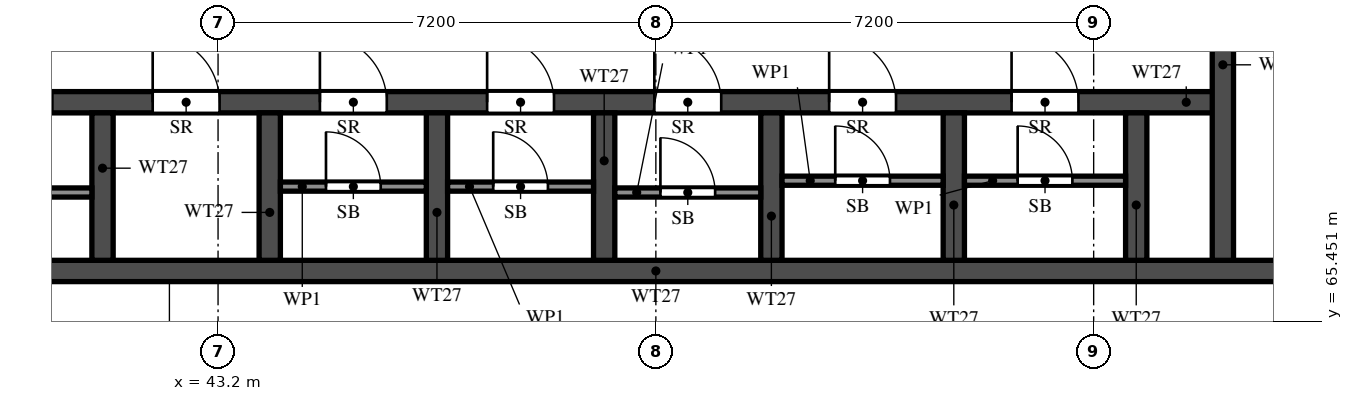
"""IFC4 building model, lengths in metres.
Left out: names, types, materials, properties, quantities, classifications, styles, units other than length and angle.
Written with IfcOpenShell. Run it as: python <this file> out.ifc"""

import sys

from ifc_helpers import new_model, si_unit, direction, frame, frame_2d, origin, place, context, subcontext, project, spatial, rectangle, extrude, element, fill, save


model = new_model("IFC4")
c1 = context("Model", 3, precision=1e-05, world=origin(), true_north=direction((0.0, 1.0)))
c2 = subcontext(c1, "Body", "Model", "MODEL_VIEW")
j1 = project(units=[si_unit("LENGTHUNIT", "METRE"), si_unit("PLANEANGLEUNIT", "RADIAN")], contexts=[c1])
p1 = place(None, origin())
s1 = spatial("IfcSite", under=j1, at=p1, CompositionType="ELEMENT")
p2 = place(p1, origin())
s2 = spatial("IfcBuilding", under=s1, at=p2, CompositionType="ELEMENT")
p3 = place(p2, frame((0.0, 0.0, 146.5)))
s3 = spatial("IfcBuildingStorey", under=s2, at=p3, CompositionType="ELEMENT", Elevation=146.5)
p4 = place(p3, frame((29.7, 66.275, 0.0), z_axis=(0.0, 0.0, 1.0), x_axis=(1.0, 0.0, 0.0)))
e1 = element("IfcWall", 1, at=p4, inside=s3, PredefinedType="SHEAR", context=c2, shape_type="SweptSolid", body=[
    extrude(rectangle(XDim=41.4, YDim=0.35, at=frame_2d((20.7, 0.0))), origin(), (0.0, 0.0, 1.0), 3.2),
])
p5 = place(p4, frame((0.925, 0.0, 0.0)))
e2 = element("IfcOpeningElement", 2, at=p5, cuts=e1, PredefinedType="OPENING", context=c2, shape_type="SweptSolid", body=[
    extrude(rectangle(XDim=1.1, YDim=2.1, at=frame_2d((0.55, 1.05))), frame((0.0, 0.185, 0.0), z_axis=(0.0, -1.0, 0.0), x_axis=(1.0, 0.0, 0.0)), (0.0, 0.0, 1.0), 0.37),
])
p6 = place(p4, frame((3.712, 0.0, 0.0)))
e3 = element("IfcOpeningElement", 3, at=p6, cuts=e1, PredefinedType="OPENING", context=c2, shape_type="SweptSolid", body=[
    extrude(rectangle(XDim=1.8, YDim=2.1, at=frame_2d((0.9, 1.05))), frame((0.0, 0.185, 0.0), z_axis=(0.0, -1.0, 0.0), x_axis=(1.0, 0.0, 0.0)), (0.0, 0.0, 1.0), 0.37),
])
p7 = place(p3, frame((35.625, 69.05, 0.0), z_axis=(0.0, 0.0, 1.0), x_axis=(1.0, 0.0, 0.0)))
e4 = element("IfcWall", 4, at=p7, inside=s3, PredefinedType="SHEAR", context=c2, shape_type="SweptSolid", body=[
    extrude(rectangle(XDim=24.1, YDim=0.35, at=frame_2d((12.05, 0.0))), origin(), (0.0, 0.0, 1.0), 3.2),
])
p8 = place(p7, frame((1.0, 0.0, 0.0)))
e5 = element("IfcOpeningElement", 5, at=p8, cuts=e4, PredefinedType="OPENING", context=c2, shape_type="SweptSolid", body=[
    extrude(rectangle(XDim=1.1, YDim=2.1, at=frame_2d((0.55, 1.05))), frame((0.0, 0.185, 0.0), z_axis=(0.0, -1.0, 0.0), x_axis=(1.0, 0.0, 0.0)), (0.0, 0.0, 1.0), 0.37),
])
p9 = place(p7, frame((3.75, 0.0, 0.0)))
e6 = element("IfcOpeningElement", 6, at=p9, cuts=e4, PredefinedType="OPENING", context=c2, shape_type="SweptSolid", body=[
    extrude(rectangle(XDim=1.1, YDim=2.1, at=frame_2d((0.55, 1.05))), frame((0.0, 0.185, 0.0), z_axis=(0.0, -1.0, 0.0), x_axis=(1.0, 0.0, 0.0)), (0.0, 0.0, 1.0), 0.37),
])
p10 = place(p7, frame((6.5, 0.0, 0.0)))
e7 = element("IfcOpeningElement", 7, at=p10, cuts=e4, PredefinedType="OPENING", context=c2, shape_type="SweptSolid", body=[
    extrude(rectangle(XDim=1.1, YDim=2.1, at=frame_2d((0.55, 1.05))), frame((0.0, 0.185, 0.0), z_axis=(0.0, -1.0, 0.0), x_axis=(1.0, 0.0, 0.0)), (0.0, 0.0, 1.0), 0.37),
])
p11 = place(p7, frame((9.25, 0.0, 0.0)))
e8 = element("IfcOpeningElement", 8, at=p11, cuts=e4, PredefinedType="OPENING", context=c2, shape_type="SweptSolid", body=[
    extrude(rectangle(XDim=1.1, YDim=2.1, at=frame_2d((0.55, 1.05))), frame((0.0, 0.185, 0.0), z_axis=(0.0, -1.0, 0.0), x_axis=(1.0, 0.0, 0.0)), (0.0, 0.0, 1.0), 0.37),
])
p12 = place(p7, frame((12.0, 0.0, 0.0)))
e9 = element("IfcOpeningElement", 9, at=p12, cuts=e4, PredefinedType="OPENING", context=c2, shape_type="SweptSolid", body=[
    extrude(rectangle(XDim=1.1, YDim=2.1, at=frame_2d((0.55, 1.05))), frame((0.0, 0.185, 0.0), z_axis=(0.0, -1.0, 0.0), x_axis=(1.0, 0.0, 0.0)), (0.0, 0.0, 1.0), 0.37),
])
p13 = place(p7, frame((14.75, 0.0, 0.0)))
e10 = element("IfcOpeningElement", 10, at=p13, cuts=e4, PredefinedType="OPENING", context=c2, shape_type="SweptSolid", body=[
    extrude(rectangle(XDim=1.1, YDim=2.1, at=frame_2d((0.55, 1.05))), frame((0.0, 0.185, 0.0), z_axis=(0.0, -1.0, 0.0), x_axis=(1.0, 0.0, 0.0)), (0.0, 0.0, 1.0), 0.37),
])
p14 = place(p7, frame((17.625, 0.0, 0.0)))
e11 = element("IfcOpeningElement", 11, at=p14, cuts=e4, PredefinedType="OPENING", context=c2, shape_type="SweptSolid", body=[
    extrude(rectangle(XDim=1.1, YDim=2.1, at=frame_2d((0.55, 1.05))), frame((0.0, 0.185, 0.0), z_axis=(0.0, -1.0, 0.0), x_axis=(1.0, 0.0, 0.0)), (0.0, 0.0, 1.0), 0.37),
])
p15 = place(p7, frame((20.625, 0.0, 0.0)))
e12 = element("IfcOpeningElement", 12, at=p15, cuts=e4, PredefinedType="OPENING", context=c2, shape_type="SweptSolid", body=[
    extrude(rectangle(XDim=1.1, YDim=2.1, at=frame_2d((0.55, 1.05))), frame((0.0, 0.185, 0.0), z_axis=(0.0, -1.0, 0.0), x_axis=(1.0, 0.0, 0.0)), (0.0, 0.0, 1.0), 0.37),
])
p16 = place(p3, frame((59.725, 66.45, 0.0), z_axis=(0.0, 0.0, 1.0), x_axis=(0.0, 1.0, 0.0)))
e13 = element("IfcWall", 13, at=p16, inside=s3, PredefinedType="SHEAR", context=c2, shape_type="SweptSolid", body=[
    extrude(rectangle(XDim=6.125, YDim=0.35, at=frame_2d((3.062, 0.0))), origin(), (0.0, 0.0, 1.0), 3.2),
])
p17 = place(p16, frame((3.85, 0.0, 0.0)))
e14 = element("IfcOpeningElement", 14, at=p17, cuts=e13, PredefinedType="OPENING", context=c2, shape_type="SweptSolid", body=[
    extrude(rectangle(XDim=1.2, YDim=2.1, at=frame_2d((0.6, 1.05))), frame((0.0, 0.185, 0.0), z_axis=(0.0, -1.0, 0.0), x_axis=(1.0, 0.0, 0.0)), (0.0, 0.0, 1.0), 0.37),
])
for number, where, z_axis, x_axis in (
    (15, (41.3, 66.45, 0.0), (0.0, 0.0, 1.0), (0.0, 1.0, 0.0)),
    (16, (44.05, 66.45, 0.0), (0.0, 0.0, 1.0), (0.0, 1.0, 0.0)),
    (17, (46.8, 66.45, 0.0), (0.0, 0.0, 1.0), (0.0, 1.0, 0.0)),
    (18, (49.55, 66.45, 0.0), (0.0, 0.0, 1.0), (0.0, 1.0, 0.0)),
    (19, (52.3, 66.45, 0.0), (0.0, 0.0, 1.0), (0.0, 1.0, 0.0)),
    (20, (55.3, 66.45, 0.0), (0.0, 0.0, 1.0), (0.0, 1.0, 0.0)),
    (21, (58.3, 66.45, 0.0), (0.0, 0.0, 1.0), (0.0, 1.0, 0.0)),
):
    element("IfcWall", number, at=place(p3, frame(where, z_axis=z_axis, x_axis=x_axis)), inside=s3, PredefinedType="SHEAR", context=c2, shape_type="SweptSolid", body=[
        extrude(rectangle(XDim=2.425, YDim=0.35, at=frame_2d((1.212, 0.0))), origin(), (0.0, 0.0, 1.0), 3.2),
    ])
p18 = place(p3, frame((38.725, 67.565, 0.0), z_axis=(0.0, 0.0, 1.0), x_axis=(1.0, 0.0, 0.0)))
e22 = element("IfcWall", 22, at=p18, inside=s3, PredefinedType="PARTITIONING", context=c2, shape_type="SweptSolid", body=[
    extrude(rectangle(XDim=2.4, YDim=0.15, at=frame_2d((1.2, 0.0))), origin(), (0.0, 0.0, 1.0), 3.2),
])
p19 = place(p18, frame((0.75, 0.0, 0.0)))
e23 = element("IfcOpeningElement", 23, at=p19, cuts=e22, PredefinedType="OPENING", context=c2, shape_type="SweptSolid", body=[
    extrude(rectangle(XDim=0.9, YDim=2.1, at=frame_2d((0.45, 1.05))), frame((0.0, 0.085, 0.0), z_axis=(0.0, -1.0, 0.0), x_axis=(1.0, 0.0, 0.0)), (0.0, 0.0, 1.0), 0.17),
])
p20 = place(p3, frame((44.225, 67.663, 0.0), z_axis=(0.0, 0.0, 1.0), x_axis=(1.0, 0.0, 0.0)))
e24 = element("IfcWall", 24, at=p20, inside=s3, PredefinedType="PARTITIONING", context=c2, shape_type="SweptSolid", body=[
    extrude(rectangle(XDim=2.4, YDim=0.15, at=frame_2d((1.2, 0.0))), origin(), (0.0, 0.0, 1.0), 3.2),
])
p21 = place(p20, frame((0.75, 0.0, 0.0)))
e25 = element("IfcOpeningElement", 25, at=p21, cuts=e24, PredefinedType="OPENING", context=c2, shape_type="SweptSolid", body=[
    extrude(rectangle(XDim=0.9, YDim=2.1, at=frame_2d((0.45, 1.05))), frame((0.0, 0.085, 0.0), z_axis=(0.0, -1.0, 0.0), x_axis=(1.0, 0.0, 0.0)), (0.0, 0.0, 1.0), 0.17),
])
p22 = place(p3, frame((46.975, 67.663, 0.0), z_axis=(0.0, 0.0, 1.0), x_axis=(1.0, 0.0, 0.0)))
e26 = element("IfcWall", 26, at=p22, inside=s3, PredefinedType="PARTITIONING", context=c2, shape_type="SweptSolid", body=[
    extrude(rectangle(XDim=2.4, YDim=0.15, at=frame_2d((1.2, 0.0))), origin(), (0.0, 0.0, 1.0), 3.2),
])
p23 = place(p22, frame((0.75, 0.0, 0.0)))
e27 = element("IfcOpeningElement", 27, at=p23, cuts=e26, PredefinedType="OPENING", context=c2, shape_type="SweptSolid", body=[
    extrude(rectangle(XDim=0.9, YDim=2.1, at=frame_2d((0.45, 1.05))), frame((0.0, 0.085, 0.0), z_axis=(0.0, -1.0, 0.0), x_axis=(1.0, 0.0, 0.0)), (0.0, 0.0, 1.0), 0.17),
])
p24 = place(p3, frame((49.725, 67.565, 0.0), z_axis=(0.0, 0.0, 1.0), x_axis=(1.0, 0.0, 0.0)))
e28 = element("IfcWall", 28, at=p24, inside=s3, PredefinedType="PARTITIONING", context=c2, shape_type="SweptSolid", body=[
    extrude(rectangle(XDim=2.4, YDim=0.15, at=frame_2d((1.2, 0.0))), origin(), (0.0, 0.0, 1.0), 3.2),
])
p25 = place(p24, frame((0.75, 0.0, 0.0)))
e29 = element("IfcOpeningElement", 29, at=p25, cuts=e28, PredefinedType="OPENING", context=c2, shape_type="SweptSolid", body=[
    extrude(rectangle(XDim=0.9, YDim=2.1, at=frame_2d((0.45, 1.05))), frame((0.0, 0.085, 0.0), z_axis=(0.0, -1.0, 0.0), x_axis=(1.0, 0.0, 0.0)), (0.0, 0.0, 1.0), 0.17),
])
p26 = place(p3, frame((52.475, 67.76, 0.0), z_axis=(0.0, 0.0, 1.0), x_axis=(1.0, 0.0, 0.0)))
e30 = element("IfcWall", 30, at=p26, inside=s3, PredefinedType="PARTITIONING", context=c2, shape_type="SweptSolid", body=[
    extrude(rectangle(XDim=2.65, YDim=0.15, at=frame_2d((1.325, 0.0))), origin(), (0.0, 0.0, 1.0), 3.2),
])
p27 = place(p26, frame((0.875, 0.0, 0.0)))
e31 = element("IfcOpeningElement", 31, at=p27, cuts=e30, PredefinedType="OPENING", context=c2, shape_type="SweptSolid", body=[
    extrude(rectangle(XDim=0.9, YDim=2.1, at=frame_2d((0.45, 1.05))), frame((0.0, 0.085, 0.0), z_axis=(0.0, -1.0, 0.0), x_axis=(1.0, 0.0, 0.0)), (0.0, 0.0, 1.0), 0.17),
])
p28 = place(p3, frame((55.475, 67.76, 0.0), z_axis=(0.0, 0.0, 1.0), x_axis=(1.0, 0.0, 0.0)))
e32 = element("IfcWall", 32, at=p28, inside=s3, PredefinedType="PARTITIONING", context=c2, shape_type="SweptSolid", body=[
    extrude(rectangle(XDim=2.65, YDim=0.15, at=frame_2d((1.325, 0.0))), origin(), (0.0, 0.0, 1.0), 3.2),
])
p29 = place(p28, frame((0.875, 0.0, 0.0)))
e33 = element("IfcOpeningElement", 33, at=p29, cuts=e32, PredefinedType="OPENING", context=c2, shape_type="SweptSolid", body=[
    extrude(rectangle(XDim=0.9, YDim=2.1, at=frame_2d((0.45, 1.05))), frame((0.0, 0.085, 0.0), z_axis=(0.0, -1.0, 0.0), x_axis=(1.0, 0.0, 0.0)), (0.0, 0.0, 1.0), 0.17),
])
p30 = place(p10, origin())
e34 = element("IfcDoor", 34, at=p30, inside=s3, OperationType="SINGLE_SWING_RIGHT", PredefinedType="DOOR", context=c2, shape_type="SweptSolid", body=[
    extrude(rectangle(XDim=1.1, YDim=2.1, at=frame_2d((0.55, 1.05))), frame((0.0, 0.025, 0.0), z_axis=(0.0, -1.0, 0.0), x_axis=(1.0, 0.0, 0.0)), (0.0, 0.0, 1.0), 0.05),
])
fill(e7, e34)
p31 = place(p11, origin())
e35 = element("IfcDoor", 35, at=p31, inside=s3, OperationType="SINGLE_SWING_LEFT", PredefinedType="DOOR", context=c2, shape_type="SweptSolid", body=[
    extrude(rectangle(XDim=1.1, YDim=2.1, at=frame_2d((0.55, 1.05))), frame((0.0, 0.025, 0.0), z_axis=(0.0, -1.0, 0.0), x_axis=(1.0, 0.0, 0.0)), (0.0, 0.0, 1.0), 0.05),
])
fill(e8, e35)
p32 = place(p21, origin())
e36 = element("IfcDoor", 36, at=p32, inside=s3, OperationType="SINGLE_SWING_LEFT", PredefinedType="DOOR", context=c2, shape_type="SweptSolid", body=[
    extrude(rectangle(XDim=0.9, YDim=2.1, at=frame_2d((0.45, 1.05))), frame((0.0, 0.025, 0.0), z_axis=(0.0, -1.0, 0.0), x_axis=(1.0, 0.0, 0.0)), (0.0, 0.0, 1.0), 0.05),
])
fill(e25, e36)
p33 = place(p12, origin())
e37 = element("IfcDoor", 37, at=p33, inside=s3, OperationType="SINGLE_SWING_RIGHT", PredefinedType="DOOR", context=c2, shape_type="SweptSolid", body=[
    extrude(rectangle(XDim=1.1, YDim=2.1, at=frame_2d((0.55, 1.05))), frame((0.0, 0.025, 0.0), z_axis=(0.0, -1.0, 0.0), x_axis=(1.0, 0.0, 0.0)), (0.0, 0.0, 1.0), 0.05),
])
fill(e9, e37)
p34 = place(p23, origin())
e38 = element("IfcDoor", 38, at=p34, inside=s3, OperationType="SINGLE_SWING_RIGHT", PredefinedType="DOOR", context=c2, shape_type="SweptSolid", body=[
    extrude(rectangle(XDim=0.9, YDim=2.1, at=frame_2d((0.45, 1.05))), frame((0.0, 0.025, 0.0), z_axis=(0.0, -1.0, 0.0), x_axis=(1.0, 0.0, 0.0)), (0.0, 0.0, 1.0), 0.05),
])
fill(e27, e38)
p35 = place(p13, origin())
e39 = element("IfcDoor", 39, at=p35, inside=s3, OperationType="SINGLE_SWING_LEFT", PredefinedType="DOOR", context=c2, shape_type="SweptSolid", body=[
    extrude(rectangle(XDim=1.1, YDim=2.1, at=frame_2d((0.55, 1.05))), frame((0.0, 0.025, 0.0), z_axis=(0.0, -1.0, 0.0), x_axis=(1.0, 0.0, 0.0)), (0.0, 0.0, 1.0), 0.05),
])
fill(e10, e39)
p36 = place(p25, origin())
e40 = element("IfcDoor", 40, at=p36, inside=s3, OperationType="SINGLE_SWING_LEFT", PredefinedType="DOOR", context=c2, shape_type="SweptSolid", body=[
    extrude(rectangle(XDim=0.9, YDim=2.1, at=frame_2d((0.45, 1.05))), frame((0.0, 0.025, 0.0), z_axis=(0.0, -1.0, 0.0), x_axis=(1.0, 0.0, 0.0)), (0.0, 0.0, 1.0), 0.05),
])
fill(e29, e40)
p37 = place(p14, origin())
e41 = element("IfcDoor", 41, at=p37, inside=s3, OperationType="SINGLE_SWING_RIGHT", PredefinedType="DOOR", context=c2, shape_type="SweptSolid", body=[
    extrude(rectangle(XDim=1.1, YDim=2.1, at=frame_2d((0.55, 1.05))), frame((0.0, 0.025, 0.0), z_axis=(0.0, -1.0, 0.0), x_axis=(1.0, 0.0, 0.0)), (0.0, 0.0, 1.0), 0.05),
])
fill(e11, e41)
p38 = place(p27, origin())
e42 = element("IfcDoor", 42, at=p38, inside=s3, OperationType="SINGLE_SWING_LEFT", PredefinedType="DOOR", context=c2, shape_type="SweptSolid", body=[
    extrude(rectangle(XDim=0.9, YDim=2.1, at=frame_2d((0.45, 1.05))), frame((0.0, 0.025, 0.0), z_axis=(0.0, -1.0, 0.0), x_axis=(1.0, 0.0, 0.0)), (0.0, 0.0, 1.0), 0.05),
])
fill(e31, e42)
p39 = place(p15, origin())
e43 = element("IfcDoor", 43, at=p39, inside=s3, OperationType="SINGLE_SWING_RIGHT", PredefinedType="DOOR", context=c2, shape_type="SweptSolid", body=[
    extrude(rectangle(XDim=1.1, YDim=2.1, at=frame_2d((0.55, 1.05))), frame((0.0, 0.025, 0.0), z_axis=(0.0, -1.0, 0.0), x_axis=(1.0, 0.0, 0.0)), (0.0, 0.0, 1.0), 0.05),
])
fill(e12, e43)
p40 = place(p29, origin())
e44 = element("IfcDoor", 44, at=p40, inside=s3, OperationType="SINGLE_SWING_LEFT", PredefinedType="DOOR", context=c2, shape_type="SweptSolid", body=[
    extrude(rectangle(XDim=0.9, YDim=2.1, at=frame_2d((0.45, 1.05))), frame((0.0, 0.025, 0.0), z_axis=(0.0, -1.0, 0.0), x_axis=(1.0, 0.0, 0.0)), (0.0, 0.0, 1.0), 0.05),
])
fill(e33, e44)
save(model, sys.argv[1])
